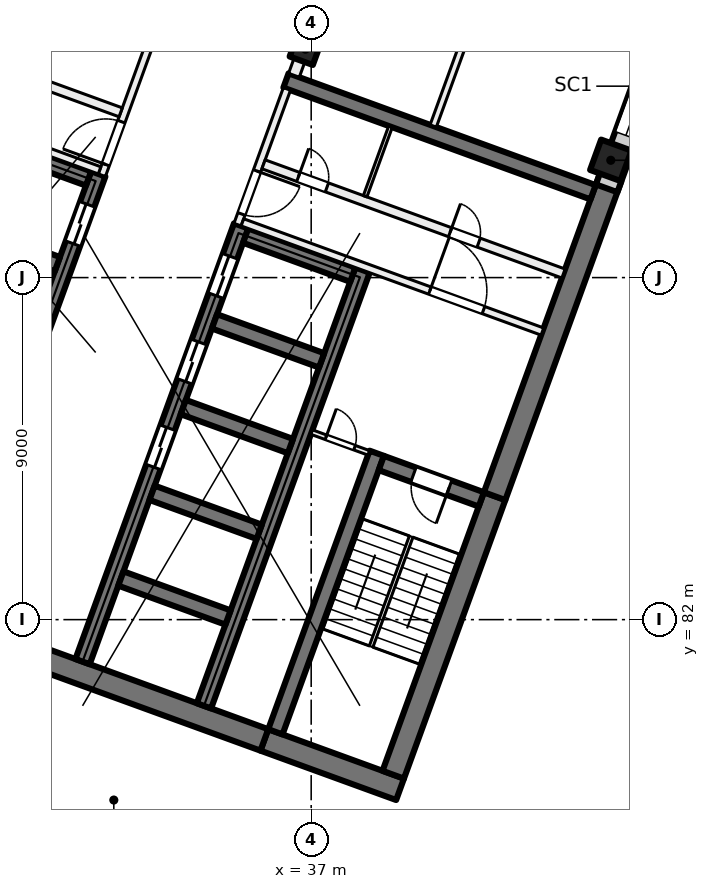
"""IFC4 building model, lengths in metres.
Left out: names, types, materials, properties, quantities, classifications, styles, units other than length and angle.
Written with IfcOpenShell. Run it as: python <this file> out.ifc"""

import sys

from ifc_helpers import new_model, si_unit, direction, frame, frame_2d, origin, origin_2d, place, context, subcontext, project, spatial, rectangle, extrude, element, fill, save


model = new_model("IFC4")
c1 = context("Model", 3, precision=1e-05, world=origin(), true_north=direction((0.0, 1.0)))
c2 = subcontext(c1, "Body", "Model", "MODEL_VIEW")
j1 = project(units=[si_unit("LENGTHUNIT", "METRE"), si_unit("PLANEANGLEUNIT", "RADIAN")], contexts=[c1])
p1 = place(None, origin())
s1 = spatial("IfcSite", under=j1, at=p1, CompositionType="ELEMENT")
p2 = place(p1, origin())
s2 = spatial("IfcBuilding", under=s1, at=p2, CompositionType="ELEMENT")
p3 = place(p2, frame((0.0, 0.0, 113.0)))
s3 = spatial("IfcBuildingStorey", under=s2, at=p3, CompositionType="ELEMENT", Elevation=113.0)
p4 = place(p3, frame((36.849, 97.011, 0.0), z_axis=(0.0, 0.0, 1.0), x_axis=(-0.342020143326, -0.939692620786, 0.0)))
e1 = element("IfcColumn", 1, at=p4, inside=s3, PredefinedType="COLUMN", context=c2, shape_type="SweptSolid", body=[
    extrude(rectangle(XDim=0.65, YDim=0.65, at=origin_2d()), origin(), (0.0, 0.0, 1.0), 4.0),
])
p5 = place(p3, frame((44.884, 94.087, 0.0), z_axis=(0.0, 0.0, 1.0), x_axis=(-0.342020143326, -0.939692620786, 0.0)))
e2 = element("IfcColumn", 2, at=p5, inside=s3, PredefinedType="COLUMN", context=c2, shape_type="SweptSolid", body=[
    extrude(rectangle(XDim=0.85, YDim=0.85, at=origin_2d()), origin(), (0.0, 0.0, 1.0), 4.0),
])
p6 = place(p3, frame((39.338, 77.535, 0.0), z_axis=(0.0, 0.0, 1.0), x_axis=(-0.939701471648, 0.341995824804, 0.0)))
e3 = element("IfcWall", 3, at=p6, inside=s3, PredefinedType="SHEAR", context=c2, shape_type="SweptSolid", body=[
    extrude(rectangle(XDim=3.8, YDim=0.6, at=frame_2d((1.9, 0.0))), origin(), (0.0, 0.0, 1.0), 4.0),
])
p7 = place(p3, frame((35.767, 78.835, 0.0), z_axis=(0.0, 0.0, 1.0), x_axis=(-0.939692894512, 0.342019391267, 0.0)))
e4 = element("IfcWall", 4, at=p7, inside=s3, PredefinedType="SHEAR", context=c2, shape_type="SweptSolid", body=[
    extrude(rectangle(XDim=14.4, YDim=0.6, at=frame_2d((7.2, 0.0))), origin(), (0.0, 0.0, 1.0), 4.0),
])
p8 = place(p3, frame((39.159, 77.92, 0.0), z_axis=(0.0, 0.0, 1.0), x_axis=(0.342016982193, 0.939693771338, 0.0)))
e5 = element("IfcWall", 5, at=p8, inside=s3, PredefinedType="SHEAR", context=c2, shape_type="SweptSolid", body=[
    extrude(rectangle(XDim=7.8, YDim=0.6, at=frame_2d((3.9, 0.0))), origin(), (0.0, 0.0, 1.0), 4.0),
])
p9 = place(p3, frame((41.827, 85.249, 0.0), z_axis=(0.0, 0.0, 1.0), x_axis=(0.342017595281, 0.939693548195, 0.0)))
e6 = element("IfcWall", 6, at=p9, inside=s3, PredefinedType="SHEAR", context=c2, shape_type="SweptSolid", body=[
    extrude(rectangle(XDim=8.925, YDim=0.6, at=frame_2d((4.462, 0.0))), origin(), (0.0, 0.0, 1.0), 4.0),
])
p10 = place(p3, frame((36.058, 79.048, 0.0), z_axis=(0.0, 0.0, 1.0), x_axis=(0.342016982193, 0.939693771338, 0.0)))
e7 = element("IfcWall", 7, at=p10, inside=s3, PredefinedType="SHEAR", context=c2, shape_type="SweptSolid", body=[
    extrude(rectangle(XDim=7.8, YDim=0.4, at=frame_2d((3.9, 0.0))), origin(), (0.0, 0.0, 1.0), 4.0),
])
p11 = place(p3, frame((41.476, 85.164, 0.0), z_axis=(0.0, 0.0, 1.0), x_axis=(-0.939678810556, 0.342058084236, 0.0)))
e8 = element("IfcWall", 8, at=p11, inside=s3, PredefinedType="SHEAR", context=c2, shape_type="SweptSolid", body=[
    extrude(rectangle(XDim=2.8, YDim=0.4, at=frame_2d((1.4, 0.0))), origin(), (0.0, 0.0, 1.0), 4.0),
])
p12 = place(p11, frame((0.9, 0.0, 0.0)))
e9 = element("IfcOpeningElement", 9, at=p12, cuts=e8, PredefinedType="OPENING", context=c2, shape_type="SweptSolid", body=[
    extrude(rectangle(XDim=1.0, YDim=2.1, at=frame_2d((0.5, 1.05))), frame((0.0, 0.21, 0.0), z_axis=(0.0, -1.0, 0.0), x_axis=(1.0, 0.0, 0.0)), (0.0, 0.0, 1.0), 0.42),
])
p13 = place(p3, frame((30.984, 80.895, 0.0), z_axis=(0.0, 0.0, 1.0), x_axis=(0.342021021735, 0.939692301071, 0.0)))
e10 = element("IfcWall", 10, at=p13, inside=s3, PredefinedType="SHEAR", context=c2, shape_type="SweptSolid", body=[
    extrude(rectangle(XDim=12.2, YDim=0.4, at=frame_2d((6.1, 0.0))), origin(), (0.0, 0.0, 1.0), 4.0),
])
p14 = place(p13, frame((5.45, 0.0, 0.0)))
e11 = element("IfcOpeningElement", 11, at=p14, cuts=e10, PredefinedType="OPENING", context=c2, shape_type="SweptSolid", body=[
    extrude(rectangle(XDim=1.1, YDim=2.1, at=frame_2d((0.55, 1.05))), frame((0.0, 0.21, 0.0), z_axis=(0.0, -1.0, 0.0), x_axis=(1.0, 0.0, 0.0)), (0.0, 0.0, 1.0), 0.42),
])
p15 = place(p13, frame((7.85, 0.0, 0.0)))
e12 = element("IfcOpeningElement", 12, at=p15, cuts=e10, PredefinedType="OPENING", context=c2, shape_type="SweptSolid", body=[
    extrude(rectangle(XDim=1.1, YDim=2.1, at=frame_2d((0.55, 1.05))), frame((0.0, 0.21, 0.0), z_axis=(0.0, -1.0, 0.0), x_axis=(1.0, 0.0, 0.0)), (0.0, 0.0, 1.0), 0.42),
])
p16 = place(p13, frame((10.25, 0.0, 0.0)))
e13 = element("IfcOpeningElement", 13, at=p16, cuts=e10, PredefinedType="OPENING", context=c2, shape_type="SweptSolid", body=[
    extrude(rectangle(XDim=1.1, YDim=2.1, at=frame_2d((0.55, 1.05))), frame((0.0, 0.21, 0.0), z_axis=(0.0, -1.0, 0.0), x_axis=(1.0, 0.0, 0.0)), (0.0, 0.0, 1.0), 0.42),
])
p17 = place(p3, frame((34.178, 79.732, 0.0), z_axis=(0.0, 0.0, 1.0), x_axis=(0.342014590177, 0.939694641948, 0.0)))
e14 = element("IfcWall", 14, at=p17, inside=s3, PredefinedType="SHEAR", context=c2, shape_type="SweptSolid", body=[
    extrude(rectangle(XDim=12.2, YDim=0.4, at=frame_2d((6.1, 0.0))), origin(), (0.0, 0.0, 1.0), 4.0),
])
for number, where, z_axis, x_axis in (
    (15, (34.812, 82.056, 0.0), (0.0, 0.0, 1.0), (-0.94, 0.342, 0.0)),
    (16, (35.632, 84.311, 0.0), (0.0, 0.0, 1.0), (-0.94, 0.342, 0.0)),
    (17, (36.453, 86.566, 0.0), (0.0, 0.0, 1.0), (-0.94, 0.342, 0.0)),
    (18, (37.274, 88.822, 0.0), (0.0, 0.0, 1.0), (-0.94, 0.342, 0.0)),
):
    element("IfcWall", number, at=place(p3, frame(where, z_axis=z_axis, x_axis=x_axis)), inside=s3, PredefinedType="SHEAR", context=c2, shape_type="SweptSolid", body=[
        extrude(rectangle(XDim=3.0, YDim=0.4, at=frame_2d((1.5, 0.0))), origin(), (0.0, 0.0, 1.0), 4.0),
    ])
p18 = place(p3, frame((38.095, 91.077, 0.0), z_axis=(0.0, 0.0, 1.0), x_axis=(-0.939676934218, 0.342063238742, 0.0)))
e19 = element("IfcWall", 19, at=p18, inside=s3, PredefinedType="SHEAR", context=c2, shape_type="SweptSolid", body=[
    extrude(rectangle(XDim=3.0, YDim=0.4, at=frame_2d((1.5, 0.0))), origin(), (0.0, 0.0, 1.0), 4.0),
])
p19 = place(p3, frame((27.225, 82.263, 0.0), z_axis=(0.0, 0.0, 1.0), x_axis=(0.342014590177, 0.939694641948, 0.0)))
e20 = element("IfcWall", 20, at=p19, inside=s3, PredefinedType="SHEAR", context=c2, shape_type="SweptSolid", body=[
    extrude(rectangle(XDim=12.2, YDim=0.4, at=frame_2d((6.1, 0.0))), origin(), (0.0, 0.0, 1.0), 4.0),
])
p20 = place(p19, frame((10.25, 0.0, 0.0)))
e21 = element("IfcOpeningElement", 21, at=p20, cuts=e20, PredefinedType="OPENING", context=c2, shape_type="SweptSolid", body=[
    extrude(rectangle(XDim=1.1, YDim=2.1, at=frame_2d((0.55, 1.05))), frame((0.0, 0.21, 0.0), z_axis=(0.0, -1.0, 0.0), x_axis=(1.0, 0.0, 0.0)), (0.0, 0.0, 1.0), 0.42),
])
p21 = place(p19, frame((0.6, 0.0, 0.0)))
e22 = element("IfcOpeningElement", 22, at=p21, cuts=e20, PredefinedType="OPENING", context=c2, shape_type="SweptSolid", body=[
    extrude(rectangle(XDim=1.0, YDim=2.1, at=frame_2d((0.5, 1.05))), frame((0.0, 0.21, 0.0), z_axis=(0.0, -1.0, 0.0), x_axis=(1.0, 0.0, 0.0)), (0.0, 0.0, 1.0), 0.42),
])
for number, where, z_axis, x_axis in (
    (23, (30.32, 91.353, 0.0), (0.0, 0.0, 1.0), (-0.94, 0.342, 0.0)),
    (24, (31.141, 93.608, 0.0), (0.0, 0.0, 1.0), (-0.94, 0.342, 0.0)),
):
    element("IfcWall", number, at=place(p3, frame(where, z_axis=z_axis, x_axis=x_axis)), inside=s3, PredefinedType="SHEAR", context=c2, shape_type="SweptSolid", body=[
        extrude(rectangle(XDim=3.0, YDim=0.4, at=frame_2d((1.5, 0.0))), origin(), (0.0, 0.0, 1.0), 4.0),
    ])
p22 = place(p3, frame((44.418, 93.245, 0.0), z_axis=(0.0, 0.0, 1.0), x_axis=(-0.93969060187, 0.342025690201, 0.0)))
e25 = element("IfcWall", 25, at=p22, inside=s3, PredefinedType="SHEAR", context=c2, shape_type="SweptSolid", body=[
    extrude(rectangle(XDim=8.6, YDim=0.4, at=frame_2d((4.3, 0.0))), origin(), (0.0, 0.0, 1.0), 4.0),
])
p23 = place(p3, frame((52.212, 113.783, 0.0), z_axis=(0.0, 0.0, 1.0), x_axis=(-0.34202521188, -0.939690775968, 0.0)))
e26 = element("IfcWall", 26, at=p23, inside=s3, PredefinedType="SOLIDWALL", context=c2, shape_type="SweptSolid", body=[
    extrude(rectangle(XDim=21.745, YDim=0.6, at=frame_2d((10.873, 0.0))), origin(), (0.0, 0.0, 1.0), 3.625),
])
p24 = place(p23, frame((3.765, 0.0, 0.9)))
e27 = element("IfcOpeningElement", 27, at=p24, cuts=e26, PredefinedType="OPENING", context=c2, shape_type="SweptSolid", body=[
    extrude(rectangle(XDim=3.0, YDim=2.4, at=frame_2d((1.5, 1.2))), frame((0.0, 0.31, 0.0), z_axis=(0.0, -1.0, 0.0), x_axis=(1.0, 0.0, 0.0)), (0.0, 0.0, 1.0), 0.62),
])
p25 = place(p23, frame((8.265, 0.0, 0.9)))
e28 = element("IfcOpeningElement", 28, at=p25, cuts=e26, PredefinedType="OPENING", context=c2, shape_type="SweptSolid", body=[
    extrude(rectangle(XDim=3.0, YDim=2.4, at=frame_2d((1.5, 1.2))), frame((0.0, 0.31, 0.0), z_axis=(0.0, -1.0, 0.0), x_axis=(1.0, 0.0, 0.0)), (0.0, 0.0, 1.0), 0.62),
])
p26 = place(p23, frame((12.765, 0.0, 0.9)))
e29 = element("IfcOpeningElement", 29, at=p26, cuts=e26, PredefinedType="OPENING", context=c2, shape_type="SweptSolid", body=[
    extrude(rectangle(XDim=3.0, YDim=2.4, at=frame_2d((1.5, 1.2))), frame((0.0, 0.31, 0.0), z_axis=(0.0, -1.0, 0.0), x_axis=(1.0, 0.0, 0.0)), (0.0, 0.0, 1.0), 0.62),
])
p27 = place(p23, frame((17.265, 0.0, 0.9)))
e30 = element("IfcOpeningElement", 30, at=p27, cuts=e26, PredefinedType="OPENING", context=c2, shape_type="SweptSolid", body=[
    extrude(rectangle(XDim=3.0, YDim=2.4, at=frame_2d((1.5, 1.2))), frame((0.0, 0.31, 0.0), z_axis=(0.0, -1.0, 0.0), x_axis=(1.0, 0.0, 0.0)), (0.0, 0.0, 1.0), 0.62),
])
p28 = place(p3, frame((31.491, 93.693, 0.0), z_axis=(0.0, 0.0, 1.0), x_axis=(0.341995824804, 0.939701471648, 0.0)))
e31 = element("IfcWall", 31, at=p28, inside=s3, PredefinedType="PARTITIONING", context=c2, shape_type="SweptSolid", body=[
    extrude(rectangle(XDim=3.8, YDim=0.2, at=frame_2d((1.9, 0.0))), origin(), (0.0, 0.0, 1.0), 3.625),
])
p29 = place(p28, frame((0.3, 0.0, 0.0)))
e32 = element("IfcOpeningElement", 32, at=p29, cuts=e31, PredefinedType="OPENING", context=c2, shape_type="SweptSolid", body=[
    extrude(rectangle(XDim=1.2, YDim=2.1, at=frame_2d((0.6, 1.05))), frame((0.0, 0.11, 0.0), z_axis=(0.0, -1.0, 0.0), x_axis=(1.0, 0.0, 0.0)), (0.0, 0.0, 1.0), 0.22),
])
p30 = place(p3, frame((23.538, 96.694, 0.0), z_axis=(0.0, 0.0, 1.0), x_axis=(0.939691552312, -0.342023078919, 0.0)))
e33 = element("IfcWall", 33, at=p30, inside=s3, PredefinedType="PARTITIONING", context=c2, shape_type="SweptSolid", body=[
    extrude(rectangle(XDim=8.4, YDim=0.2, at=frame_2d((4.2, 0.0))), origin(), (0.0, 0.0, 1.0), 3.625),
])
p31 = place(p30, frame((1.65, 0.0, 0.0)))
e34 = element("IfcOpeningElement", 34, at=p31, cuts=e33, PredefinedType="OPENING", context=c2, shape_type="SweptSolid", body=[
    extrude(rectangle(XDim=1.5, YDim=2.1, at=frame_2d((0.75, 1.05))), frame((0.0, 0.11, 0.0), z_axis=(0.0, -1.0, 0.0), x_axis=(1.0, 0.0, 0.0)), (0.0, 0.0, 1.0), 0.22),
])
p32 = place(p3, frame((24.094, 98.221, 0.0), z_axis=(0.0, 0.0, 1.0), x_axis=(0.939691552312, -0.342023078919, 0.0)))
e35 = element("IfcWall", 35, at=p32, inside=s3, PredefinedType="PARTITIONING", context=c2, shape_type="SweptSolid", body=[
    extrude(rectangle(XDim=8.4, YDim=0.25, at=frame_2d((4.2, 0.0))), origin(), (0.0, 0.0, 1.0), 3.625),
])
p33 = place(p32, frame((5.225, 0.0, 0.0)))
e36 = element("IfcOpeningElement", 36, at=p33, cuts=e35, PredefinedType="OPENING", context=c2, shape_type="SweptSolid", body=[
    extrude(rectangle(XDim=0.8, YDim=2.1, at=frame_2d((0.4, 1.05))), frame((0.0, 0.135, 0.0), z_axis=(0.0, -1.0, 0.0), x_axis=(1.0, 0.0, 0.0)), (0.0, 0.0, 1.0), 0.27),
])
p34 = place(p32, frame((0.975, 0.0, 0.0)))
e37 = element("IfcOpeningElement", 37, at=p34, cuts=e35, PredefinedType="OPENING", context=c2, shape_type="SweptSolid", body=[
    extrude(rectangle(XDim=0.8, YDim=2.1, at=frame_2d((0.4, 1.05))), frame((0.0, 0.135, 0.0), z_axis=(0.0, -1.0, 0.0), x_axis=(1.0, 0.0, 0.0)), (0.0, 0.0, 1.0), 0.27),
])
p35 = place(p3, frame((36.362, 95.964, 0.0), z_axis=(0.0, 0.0, 1.0), x_axis=(-0.341995824804, -0.939701471648, 0.0)))
e38 = element("IfcWall", 38, at=p35, inside=s3, PredefinedType="PARTITIONING", context=c2, shape_type="SweptSolid", body=[
    extrude(rectangle(XDim=3.8, YDim=0.2, at=frame_2d((1.9, 0.0))), origin(), (0.0, 0.0, 1.0), 3.625),
])
p36 = place(p35, frame((2.3, 0.0, 0.0)))
e39 = element("IfcOpeningElement", 39, at=p36, cuts=e38, PredefinedType="OPENING", context=c2, shape_type="SweptSolid", body=[
    extrude(rectangle(XDim=1.2, YDim=2.1, at=frame_2d((0.6, 1.05))), frame((0.0, 0.11, 0.0), z_axis=(0.0, -1.0, 0.0), x_axis=(1.0, 0.0, 0.0)), (0.0, 0.0, 1.0), 0.22),
])
p37 = place(p3, frame((35.19, 92.453, 0.0), z_axis=(0.0, 0.0, 1.0), x_axis=(0.939691552312, -0.342023078919, 0.0)))
e40 = element("IfcWall", 40, at=p37, inside=s3, PredefinedType="PARTITIONING", context=c2, shape_type="SweptSolid", body=[
    extrude(rectangle(XDim=8.4, YDim=0.2, at=frame_2d((4.2, 0.0))), origin(), (0.0, 0.0, 1.0), 3.625),
])
p38 = place(p37, frame((5.25, 0.0, 0.0)))
e41 = element("IfcOpeningElement", 41, at=p38, cuts=e40, PredefinedType="OPENING", context=c2, shape_type="SweptSolid", body=[
    extrude(rectangle(XDim=1.5, YDim=2.1, at=frame_2d((0.75, 1.05))), frame((0.0, 0.11, 0.0), z_axis=(0.0, -1.0, 0.0), x_axis=(1.0, 0.0, 0.0)), (0.0, 0.0, 1.0), 0.22),
])
p39 = place(p3, frame((35.746, 93.98, 0.0), z_axis=(0.0, 0.0, 1.0), x_axis=(0.939691552312, -0.342023078919, 0.0)))
e42 = element("IfcWall", 42, at=p39, inside=s3, PredefinedType="PARTITIONING", context=c2, shape_type="SweptSolid", body=[
    extrude(rectangle(XDim=8.4, YDim=0.25, at=frame_2d((4.2, 0.0))), origin(), (0.0, 0.0, 1.0), 3.625),
])
p40 = place(p39, frame((0.975, 0.0, 0.0)))
e43 = element("IfcOpeningElement", 43, at=p40, cuts=e42, PredefinedType="OPENING", context=c2, shape_type="SweptSolid", body=[
    extrude(rectangle(XDim=0.8, YDim=2.1, at=frame_2d((0.4, 1.05))), frame((0.0, 0.135, 0.0), z_axis=(0.0, -1.0, 0.0), x_axis=(1.0, 0.0, 0.0)), (0.0, 0.0, 1.0), 0.27),
])
p41 = place(p39, frame((5.225, 0.0, 0.0)))
e44 = element("IfcOpeningElement", 44, at=p41, cuts=e42, PredefinedType="OPENING", context=c2, shape_type="SweptSolid", body=[
    extrude(rectangle(XDim=0.8, YDim=2.1, at=frame_2d((0.4, 1.05))), frame((0.0, 0.135, 0.0), z_axis=(0.0, -1.0, 0.0), x_axis=(1.0, 0.0, 0.0)), (0.0, 0.0, 1.0), 0.27),
])
p42 = place(p3, frame((37.013, 86.935, 0.0), z_axis=(0.0, 0.0, 1.0), x_axis=(0.939659694648, -0.342110593602, 0.0)))
e45 = element("IfcWall", 45, at=p42, inside=s3, PredefinedType="PARTITIONING", context=c2, shape_type="SweptSolid", body=[
    extrude(rectangle(XDim=1.6, YDim=0.125, at=frame_2d((0.8, 0.0))), origin(), (0.0, 0.0, 1.0), 3.625),
])
p43 = place(p42, frame((0.4, 0.0, 0.0)))
e46 = element("IfcOpeningElement", 46, at=p43, cuts=e45, PredefinedType="OPENING", context=c2, shape_type="SweptSolid", body=[
    extrude(rectangle(XDim=0.8, YDim=2.1, at=frame_2d((0.4, 1.05))), frame((0.0, 0.073, 0.0), z_axis=(0.0, -1.0, 0.0), x_axis=(1.0, 0.0, 0.0)), (0.0, 0.0, 1.0), 0.145),
])
p44 = place(p3, frame((39.087, 94.973, 0.0), z_axis=(0.0, 0.0, 1.0), x_axis=(-0.342024501273, -0.939691034611, 0.0)))
e47 = element("IfcWall", 47, at=p44, inside=s3, PredefinedType="PARTITIONING", context=c2, shape_type="SweptSolid", body=[
    extrude(rectangle(XDim=1.95, YDim=0.1, at=frame_2d((0.975, 0.0))), origin(), (0.0, 0.0, 1.0), 3.625),
])
p45 = place(p3, frame((42.036, 100.005, 0.0), z_axis=(0.0, 0.0, 1.0), x_axis=(-0.341908323648, -0.939733312286, 0.0)))
e48 = element("IfcWall", 48, at=p45, inside=s3, PredefinedType="PARTITIONING", context=c2, shape_type="SweptSolid", body=[
    extrude(rectangle(XDim=5.338, YDim=0.175, at=frame_2d((2.669, 0.0))), origin(), (0.0, 0.0, 1.0), 3.625),
])
p46 = place(p3, frame((47.314, 125.909, 0.0), z_axis=(0.0, 0.0, 1.0), x_axis=(-0.342010770371, -0.939696032209, 0.0)))
e49 = element("IfcWall", 49, at=p46, inside=s3, PredefinedType="PARTITIONING", context=c2, shape_type="SweptSolid", body=[
    extrude(rectangle(XDim=31.485, YDim=0.3, at=frame_2d((15.742, 0.0))), origin(), (0.0, 0.0, 1.0), 3.625),
])
p47 = place(p46, frame((28.259, 0.0, 0.0)))
e50 = element("IfcOpeningElement", 50, at=p47, cuts=e49, PredefinedType="OPENING", context=c2, shape_type="SweptSolid", body=[
    extrude(rectangle(XDim=1.2, YDim=2.1, at=frame_2d((0.6, 1.05))), frame((0.0, 0.16, 0.0), z_axis=(0.0, -1.0, 0.0), x_axis=(1.0, 0.0, 0.0)), (0.0, 0.0, 1.0), 0.32),
])
p48 = place(p46, frame((18.584, 0.0, 0.0)))
e51 = element("IfcOpeningElement", 51, at=p48, cuts=e49, PredefinedType="OPENING", context=c2, shape_type="SweptSolid", body=[
    extrude(rectangle(XDim=1.8, YDim=2.1, at=frame_2d((0.9, 1.05))), frame((0.0, 0.16, 0.0), z_axis=(0.0, -1.0, 0.0), x_axis=(1.0, 0.0, 0.0)), (0.0, 0.0, 1.0), 0.32),
])
p49 = place(p46, frame((9.985, 0.0, 0.0)))
e52 = element("IfcOpeningElement", 52, at=p49, cuts=e49, PredefinedType="OPENING", context=c2, shape_type="SweptSolid", body=[
    extrude(rectangle(XDim=1.0, YDim=2.1, at=frame_2d((0.5, 1.05))), frame((0.0, 0.16, 0.0), z_axis=(0.0, -1.0, 0.0), x_axis=(1.0, 0.0, 0.0)), (0.0, 0.0, 1.0), 0.32),
])
p50 = place(p46, frame((5.484, 0.0, 0.0)))
e53 = element("IfcOpeningElement", 53, at=p50, cuts=e49, PredefinedType="OPENING", context=c2, shape_type="SweptSolid", body=[
    extrude(rectangle(XDim=1.0, YDim=2.1, at=frame_2d((0.5, 1.05))), frame((0.0, 0.16, 0.0), z_axis=(0.0, -1.0, 0.0), x_axis=(1.0, 0.0, 0.0)), (0.0, 0.0, 1.0), 0.32),
])
p51 = place(p27, origin())
e54 = element("IfcWindow", 54, at=p51, inside=s3, PartitioningType="SINGLE_PANEL", PredefinedType="WINDOW", context=c2, shape_type="SweptSolid", body=[
    extrude(rectangle(XDim=3.0, YDim=2.4, at=frame_2d((1.5, 1.2))), frame((0.0, 0.03, 0.0), z_axis=(0.0, -1.0, 0.0), x_axis=(1.0, 0.0, 0.0)), (0.0, 0.0, 1.0), 0.06),
])
fill(e30, e54)
p52 = place(p20, origin())
e55 = element("IfcDoor", 55, at=p52, inside=s3, OperationType="DOUBLE_DOOR_SLIDING", PredefinedType="DOOR", context=c2, shape_type="SweptSolid", body=[
    extrude(rectangle(XDim=1.1, YDim=2.1, at=frame_2d((0.55, 1.05))), frame((0.0, 0.025, 0.0), z_axis=(0.0, -1.0, 0.0), x_axis=(1.0, 0.0, 0.0)), (0.0, 0.0, 1.0), 0.05),
])
fill(e21, e55)
p53 = place(p14, origin())
e56 = element("IfcDoor", 56, at=p53, inside=s3, OperationType="DOUBLE_DOOR_SLIDING", PredefinedType="DOOR", context=c2, shape_type="SweptSolid", body=[
    extrude(rectangle(XDim=1.1, YDim=2.1, at=frame_2d((0.55, 1.05))), frame((0.0, 0.025, 0.0), z_axis=(0.0, -1.0, 0.0), x_axis=(1.0, 0.0, 0.0)), (0.0, 0.0, 1.0), 0.05),
])
fill(e11, e56)
p54 = place(p15, origin())
e57 = element("IfcDoor", 57, at=p54, inside=s3, OperationType="DOUBLE_DOOR_SLIDING", PredefinedType="DOOR", context=c2, shape_type="SweptSolid", body=[
    extrude(rectangle(XDim=1.1, YDim=2.1, at=frame_2d((0.55, 1.05))), frame((0.0, 0.025, 0.0), z_axis=(0.0, -1.0, 0.0), x_axis=(1.0, 0.0, 0.0)), (0.0, 0.0, 1.0), 0.05),
])
fill(e12, e57)
p55 = place(p16, origin())
e58 = element("IfcDoor", 58, at=p55, inside=s3, OperationType="DOUBLE_DOOR_SLIDING", PredefinedType="DOOR", context=c2, shape_type="SweptSolid", body=[
    extrude(rectangle(XDim=1.1, YDim=2.1, at=frame_2d((0.55, 1.05))), frame((0.0, 0.025, 0.0), z_axis=(0.0, -1.0, 0.0), x_axis=(1.0, 0.0, 0.0)), (0.0, 0.0, 1.0), 0.05),
])
fill(e13, e58)
p56 = place(p29, origin())
e59 = element("IfcDoor", 59, at=p56, inside=s3, OperationType="DOUBLE_DOOR_SINGLE_SWING", PredefinedType="DOOR", context=c2, shape_type="SweptSolid", body=[
    extrude(rectangle(XDim=1.2, YDim=2.1, at=frame_2d((0.6, 1.05))), frame((0.0, 0.025, 0.0), z_axis=(0.0, -1.0, 0.0), x_axis=(1.0, 0.0, 0.0)), (0.0, 0.0, 1.0), 0.05),
])
fill(e32, e59)
p57 = place(p36, origin())
e60 = element("IfcDoor", 60, at=p57, inside=s3, OperationType="DOUBLE_DOOR_SINGLE_SWING", PredefinedType="DOOR", context=c2, shape_type="SweptSolid", body=[
    extrude(rectangle(XDim=1.2, YDim=2.1, at=frame_2d((0.6, 1.05))), frame((0.0, 0.025, 0.0), z_axis=(0.0, -1.0, 0.0), x_axis=(1.0, 0.0, 0.0)), (0.0, 0.0, 1.0), 0.05),
])
fill(e39, e60)
p58 = place(p38, origin())
e61 = element("IfcDoor", 61, at=p58, inside=s3, OperationType="DOUBLE_DOOR_SINGLE_SWING", PredefinedType="DOOR", context=c2, shape_type="SweptSolid", body=[
    extrude(rectangle(XDim=1.5, YDim=2.1, at=frame_2d((0.75, 1.05))), frame((0.0, 0.025, 0.0), z_axis=(0.0, -1.0, 0.0), x_axis=(1.0, 0.0, 0.0)), (0.0, 0.0, 1.0), 0.05),
])
fill(e41, e61)
p59 = place(p12, origin())
e62 = element("IfcDoor", 62, at=p59, inside=s3, OperationType="SINGLE_SWING_RIGHT", PredefinedType="DOOR", context=c2, shape_type="SweptSolid", body=[
    extrude(rectangle(XDim=1.0, YDim=2.1, at=frame_2d((0.5, 1.05))), frame((0.0, 0.025, 0.0), z_axis=(0.0, -1.0, 0.0), x_axis=(1.0, 0.0, 0.0)), (0.0, 0.0, 1.0), 0.05),
])
fill(e9, e62)
p60 = place(p43, origin())
e63 = element("IfcDoor", 63, at=p60, inside=s3, OperationType="SINGLE_SWING_LEFT", PredefinedType="DOOR", context=c2, shape_type="SweptSolid", body=[
    extrude(rectangle(XDim=0.8, YDim=2.1, at=frame_2d((0.4, 1.05))), frame((0.0, 0.025, 0.0), z_axis=(0.0, -1.0, 0.0), x_axis=(1.0, 0.0, 0.0)), (0.0, 0.0, 1.0), 0.05),
])
fill(e46, e63)
p61 = place(p40, origin())
e64 = element("IfcDoor", 64, at=p61, inside=s3, OperationType="SINGLE_SWING_RIGHT", PredefinedType="DOOR", context=c2, shape_type="SweptSolid", body=[
    extrude(rectangle(XDim=0.8, YDim=2.1, at=frame_2d((0.4, 1.05))), frame((0.0, 0.025, 0.0), z_axis=(0.0, -1.0, 0.0), x_axis=(1.0, 0.0, 0.0)), (0.0, 0.0, 1.0), 0.05),
])
fill(e43, e64)
p62 = place(p41, origin())
e65 = element("IfcDoor", 65, at=p62, inside=s3, OperationType="SINGLE_SWING_LEFT", PredefinedType="DOOR", context=c2, shape_type="SweptSolid", body=[
    extrude(rectangle(XDim=0.8, YDim=2.1, at=frame_2d((0.4, 1.05))), frame((0.0, 0.025, 0.0), z_axis=(0.0, -1.0, 0.0), x_axis=(1.0, 0.0, 0.0)), (0.0, 0.0, 1.0), 0.05),
])
fill(e44, e65)
save(model, sys.argv[1])
